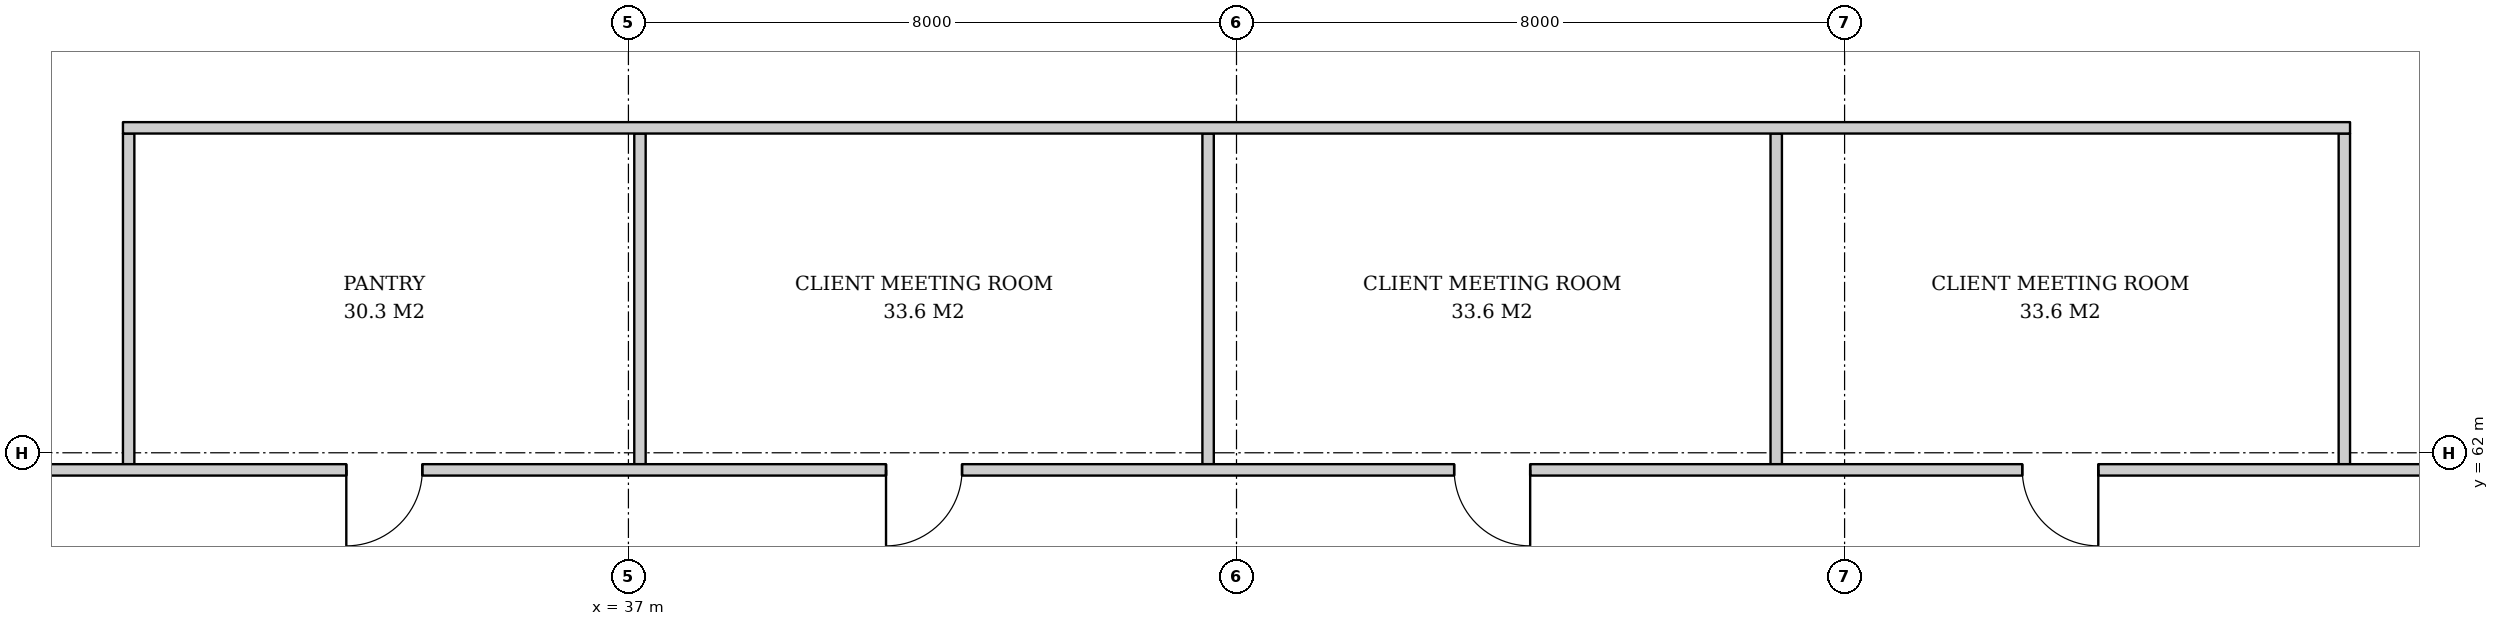
"""IFC4 building model, lengths in metres.
Left out: names, types, materials, properties, quantities, classifications, styles, units other than length and angle.
Written with IfcOpenShell. Run it as: python <this file> out.ifc"""

import sys

from ifc_helpers import new_model, si_unit, direction, frame, frame_2d, origin, place, context, subcontext, project, spatial, rectangle, extrude, element, fill, save


model = new_model("IFC4")
c1 = context("Model", 3, precision=1e-05, world=origin(), true_north=direction((0.0, 1.0)))
c2 = subcontext(c1, "Body", "Model", "MODEL_VIEW")
j1 = project(units=[si_unit("LENGTHUNIT", "METRE"), si_unit("PLANEANGLEUNIT", "RADIAN")], contexts=[c1])
p1 = place(None, origin())
s1 = spatial("IfcSite", under=j1, at=p1, CompositionType="ELEMENT")
p2 = place(p1, origin())
s2 = spatial("IfcBuilding", under=s1, at=p2, CompositionType="ELEMENT")
p3 = place(p2, frame((0.0, 0.0, 24.8)))
s3 = spatial("IfcBuildingStorey", under=s2, at=p3, CompositionType="ELEMENT", Elevation=24.8)
for number, where, z_axis, x_axis in (
    (1, (59.575, 61.85, 0.0), (0.0, 0.0, 1.0), (0.0, 1.0, 0.0)),
    (2, (52.101, 61.85, 0.0), (0.0, 0.0, 1.0), (0.0, 1.0, 0.0)),
    (3, (44.626, 61.85, 0.0), (0.0, 0.0, 1.0), (0.0, 1.0, 0.0)),
    (4, (37.152, 61.85, 0.0), (0.0, 0.0, 1.0), (0.0, 1.0, 0.0)),
    (5, (30.425, 61.85, 0.0), (0.0, 0.0, 1.0), (0.0, 1.0, 0.0)),
):
    element("IfcWall", number, at=place(p3, frame(where, z_axis=z_axis, x_axis=x_axis)), inside=s3, PredefinedType="PARTITIONING", context=c2, shape_type="SweptSolid", body=[
        extrude(rectangle(XDim=4.35, YDim=0.15, at=frame_2d((2.175, 0.0))), origin(), (0.0, 0.0, 1.0), 3.62),
    ])
p4 = place(p3, frame((59.65, 66.275, 0.0), z_axis=(0.0, 0.0, 1.0), x_axis=(-1.0, 0.0, 0.0)))
e6 = element("IfcWall", 6, at=p4, inside=s3, PredefinedType="PARTITIONING", context=c2, shape_type="SweptSolid", body=[
    extrude(rectangle(XDim=29.3, YDim=0.15, at=frame_2d((14.65, 0.0))), origin(), (0.0, 0.0, 1.0), 2.612),
])
p5 = place(p3, frame((60.85, 61.775, 0.0), z_axis=(0.0, 0.0, 1.0), x_axis=(-1.0, 0.0, 0.0)))
e7 = element("IfcWall", 7, at=p5, inside=s3, PredefinedType="PARTITIONING", context=c2, shape_type="SweptSolid", body=[
    extrude(rectangle(XDim=31.55, YDim=0.15, at=frame_2d((15.775, 0.0))), origin(), (0.0, 0.0, 1.0), 2.612),
])
p6 = place(p5, frame((4.512, 0.0, 0.0)))
e8 = element("IfcOpeningElement", 8, at=p6, cuts=e7, PredefinedType="OPENING", context=c2, shape_type="SweptSolid", body=[
    extrude(rectangle(XDim=1.0, YDim=2.1, at=frame_2d((0.5, 1.05))), frame((0.0, 0.085, 0.0), z_axis=(0.0, -1.0, 0.0), x_axis=(1.0, 0.0, 0.0)), (0.0, 0.0, 1.0), 0.17),
])
p7 = place(p5, frame((11.987, 0.0, 0.0)))
e9 = element("IfcOpeningElement", 9, at=p7, cuts=e7, PredefinedType="OPENING", context=c2, shape_type="SweptSolid", body=[
    extrude(rectangle(XDim=1.0, YDim=2.1, at=frame_2d((0.5, 1.05))), frame((0.0, 0.085, 0.0), z_axis=(0.0, -1.0, 0.0), x_axis=(1.0, 0.0, 0.0)), (0.0, 0.0, 1.0), 0.17),
])
p8 = place(p5, frame((19.461, 0.0, 0.0)))
e10 = element("IfcOpeningElement", 10, at=p8, cuts=e7, PredefinedType="OPENING", context=c2, shape_type="SweptSolid", body=[
    extrude(rectangle(XDim=1.0, YDim=2.1, at=frame_2d((0.5, 1.05))), frame((0.0, 0.085, 0.0), z_axis=(0.0, -1.0, 0.0), x_axis=(1.0, 0.0, 0.0)), (0.0, 0.0, 1.0), 0.17),
])
p9 = place(p5, frame((26.562, 0.0, 0.0)))
e11 = element("IfcOpeningElement", 11, at=p9, cuts=e7, PredefinedType="OPENING", context=c2, shape_type="SweptSolid", body=[
    extrude(rectangle(XDim=1.0, YDim=2.1, at=frame_2d((0.5, 1.05))), frame((0.0, 0.085, 0.0), z_axis=(0.0, -1.0, 0.0), x_axis=(1.0, 0.0, 0.0)), (0.0, 0.0, 1.0), 0.17),
])
p10 = place(p6, origin())
e12 = element("IfcDoor", 12, at=p10, inside=s3, OperationType="SINGLE_SWING_LEFT", PredefinedType="DOOR", context=c2, shape_type="SweptSolid", body=[
    extrude(rectangle(XDim=1.0, YDim=2.1, at=frame_2d((0.5, 1.05))), frame((0.0, 0.025, 0.0), z_axis=(0.0, -1.0, 0.0), x_axis=(1.0, 0.0, 0.0)), (0.0, 0.0, 1.0), 0.05),
])
fill(e8, e12)
p11 = place(p7, origin())
e13 = element("IfcDoor", 13, at=p11, inside=s3, OperationType="SINGLE_SWING_LEFT", PredefinedType="DOOR", context=c2, shape_type="SweptSolid", body=[
    extrude(rectangle(XDim=1.0, YDim=2.1, at=frame_2d((0.5, 1.05))), frame((0.0, 0.025, 0.0), z_axis=(0.0, -1.0, 0.0), x_axis=(1.0, 0.0, 0.0)), (0.0, 0.0, 1.0), 0.05),
])
fill(e9, e13)
p12 = place(p8, origin())
e14 = element("IfcDoor", 14, at=p12, inside=s3, OperationType="SINGLE_SWING_RIGHT", PredefinedType="DOOR", context=c2, shape_type="SweptSolid", body=[
    extrude(rectangle(XDim=1.0, YDim=2.1, at=frame_2d((0.5, 1.05))), frame((0.0, 0.025, 0.0), z_axis=(0.0, -1.0, 0.0), x_axis=(1.0, 0.0, 0.0)), (0.0, 0.0, 1.0), 0.05),
])
fill(e10, e14)
p13 = place(p9, origin())
e15 = element("IfcDoor", 15, at=p13, inside=s3, OperationType="SINGLE_SWING_RIGHT", PredefinedType="DOOR", context=c2, shape_type="SweptSolid", body=[
    extrude(rectangle(XDim=1.0, YDim=2.1, at=frame_2d((0.5, 1.05))), frame((0.0, 0.025, 0.0), z_axis=(0.0, -1.0, 0.0), x_axis=(1.0, 0.0, 0.0)), (0.0, 0.0, 1.0), 0.05),
])
fill(e11, e15)
save(model, sys.argv[1])
